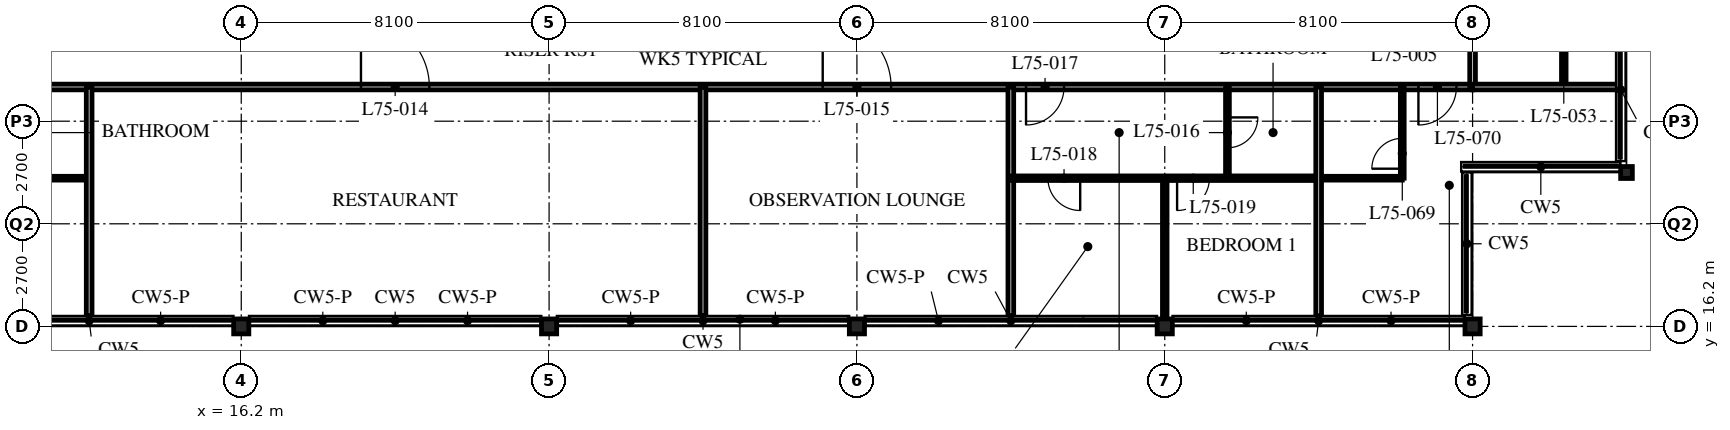
"""IFC4 building model, lengths in metres.
Left out: names, types, materials, properties, quantities, classifications, styles, units other than length and angle.
Written with IfcOpenShell. Run it as: python <this file> out.ifc"""

import sys

from ifc_helpers import new_model, si_unit, direction, frame, frame_2d, origin, origin_2d, place, context, subcontext, project, spatial, rectangle, i_section, extrude, element, fill, save


model = new_model("IFC4")
c1 = context("Model", 3, precision=1e-05, world=origin(), true_north=direction((0.0, 1.0)))
c2 = subcontext(c1, "Body", "Model", "MODEL_VIEW")
j1 = project(units=[si_unit("LENGTHUNIT", "METRE"), si_unit("PLANEANGLEUNIT", "RADIAN")], contexts=[c1])
p1 = place(None, origin())
s1 = spatial("IfcSite", under=j1, at=p1, CompositionType="ELEMENT")
p2 = place(p1, origin())
s2 = spatial("IfcBuilding", under=s1, at=p2, CompositionType="ELEMENT")
p3 = place(p2, frame((0.0, 0.0, 293.1)))
s3 = spatial("IfcBuildingStorey", under=s2, at=p3, CompositionType="ELEMENT", Elevation=293.1)
for number, where, z_axis, x_axis in (
    (1, (16.2, 16.2, 0.0), (0.0, 0.0, 1.0), (1.0, 0.0, 0.0)),
    (2, (24.3, 16.2, 0.0), (0.0, 0.0, 1.0), (1.0, 0.0, 0.0)),
    (3, (32.4, 16.2, 0.0), (0.0, 0.0, 1.0), (1.0, 0.0, 0.0)),
    (4, (40.5, 16.2, 0.0), (0.0, 0.0, 1.0), (1.0, 0.0, 0.0)),
    (5, (48.6, 16.2, 0.0), (0.0, 0.0, 1.0), (1.0, 0.0, 0.0)),
):
    element("IfcColumn", number, at=place(p3, frame(where, z_axis=z_axis, x_axis=x_axis)), inside=s3, PredefinedType="COLUMN", context=c2, shape_type="SweptSolid", body=[
        extrude(i_section(OverallWidth=0.399, OverallDepth=0.394, WebThickness=0.023, FlangeThickness=0.037, FilletRadius=0.015, at=origin_2d()), origin(), (0.0, 0.0, 1.0), 5.4),
    ])
p4 = place(p3, frame((52.65, 20.25, 0.0), z_axis=(0.0, 0.0, 1.0), x_axis=(1.0, 0.0, 0.0)))
e6 = element("IfcColumn", 6, at=p4, inside=s3, PredefinedType="COLUMN", context=c2, shape_type="SweptSolid", body=[
    extrude(i_section(OverallWidth=0.307, OverallDepth=0.314, WebThickness=0.012, FlangeThickness=0.019, FilletRadius=0.015, at=origin_2d()), origin(), (0.0, 0.0, 1.0), 5.4),
])
p5 = place(p3, frame((8.1, 22.5, 0.0), z_axis=(0.0, 0.0, 1.0), x_axis=(1.0, 0.0, 0.0)))
e7 = element("IfcWall", 7, at=p5, inside=s3, PredefinedType="PARTITIONING", context=c2, shape_type="SweptSolid", body=[
    extrude(rectangle(XDim=40.5, YDim=0.15, at=frame_2d((20.25, 0.0))), origin(), (0.0, 0.0, 1.0), 5.19),
])
p6 = place(p5, frame((11.25, 0.0, 0.0)))
e8 = element("IfcOpeningElement", 8, at=p6, cuts=e7, PredefinedType="OPENING", context=c2, shape_type="SweptSolid", body=[
    extrude(rectangle(XDim=1.8, YDim=2.4, at=frame_2d((0.9, 1.2))), frame((0.0, 0.085, 0.0), z_axis=(0.0, -1.0, 0.0), x_axis=(1.0, 0.0, 0.0)), (0.0, 0.0, 1.0), 0.17),
])
p7 = place(p5, frame((23.4, 0.0, 0.0)))
e9 = element("IfcOpeningElement", 9, at=p7, cuts=e7, PredefinedType="OPENING", context=c2, shape_type="SweptSolid", body=[
    extrude(rectangle(XDim=1.8, YDim=2.4, at=frame_2d((0.9, 1.2))), frame((0.0, 0.085, 0.0), z_axis=(0.0, -1.0, 0.0), x_axis=(1.0, 0.0, 0.0)), (0.0, 0.0, 1.0), 0.17),
])
p8 = place(p5, frame((28.75, 0.0, 0.0)))
e10 = element("IfcOpeningElement", 10, at=p8, cuts=e7, PredefinedType="OPENING", context=c2, shape_type="SweptSolid", body=[
    extrude(rectangle(XDim=1.0, YDim=2.1, at=frame_2d((0.5, 1.05))), frame((0.0, 0.085, 0.0), z_axis=(0.0, -1.0, 0.0), x_axis=(1.0, 0.0, 0.0)), (0.0, 0.0, 1.0), 0.17),
])
p9 = place(p5, frame((0.425, 0.0, 0.0)))
e11 = element("IfcOpeningElement", 11, at=p9, cuts=e7, PredefinedType="OPENING", context=c2, shape_type="SweptSolid", body=[
    extrude(rectangle(XDim=1.0, YDim=2.1, at=frame_2d((0.5, 1.05))), frame((0.0, 0.085, 0.0), z_axis=(0.0, -1.0, 0.0), x_axis=(1.0, 0.0, 0.0)), (0.0, 0.0, 1.0), 0.17),
])
p10 = place(p5, frame((39.075, 0.0, 0.0)))
e12 = element("IfcOpeningElement", 12, at=p10, cuts=e7, PredefinedType="OPENING", context=c2, shape_type="SweptSolid", body=[
    extrude(rectangle(XDim=1.0, YDim=2.1, at=frame_2d((0.5, 1.05))), frame((0.0, 0.085, 0.0), z_axis=(0.0, -1.0, 0.0), x_axis=(1.0, 0.0, 0.0)), (0.0, 0.0, 1.0), 0.17),
])
p11 = place(p3, frame((48.6, 22.5, 0.0), z_axis=(0.0, 0.0, 1.0), x_axis=(0.0, 1.0, 0.0)))
e13 = element("IfcWall", 13, at=p11, inside=s3, PredefinedType="PARTITIONING", context=c2, shape_type="SweptSolid", body=[
    extrude(rectangle(XDim=34.2, YDim=0.15, at=frame_2d((17.1, 0.0))), origin(), (0.0, 0.0, 1.0), 4.271),
])
p12 = place(p11, frame((2.65, 0.0, 0.0)))
e14 = element("IfcOpeningElement", 14, at=p12, cuts=e13, PredefinedType="OPENING", context=c2, shape_type="SweptSolid", body=[
    extrude(rectangle(XDim=1.0, YDim=2.1, at=frame_2d((0.5, 1.05))), frame((0.0, 0.085, 0.0), z_axis=(0.0, -1.0, 0.0), x_axis=(1.0, 0.0, 0.0)), (0.0, 0.0, 1.0), 0.17),
])
p13 = place(p11, frame((10.8, 0.0, 0.0)))
e15 = element("IfcOpeningElement", 15, at=p13, cuts=e13, PredefinedType="OPENING", context=c2, shape_type="SweptSolid", body=[
    extrude(rectangle(XDim=1.0, YDim=2.1, at=frame_2d((0.5, 1.05))), frame((0.0, 0.085, 0.0), z_axis=(0.0, -1.0, 0.0), x_axis=(1.0, 0.0, 0.0)), (0.0, 0.0, 1.0), 0.17),
])
p14 = place(p11, frame((18.9, 0.0, 0.0)))
e16 = element("IfcOpeningElement", 16, at=p14, cuts=e13, PredefinedType="OPENING", context=c2, shape_type="SweptSolid", body=[
    extrude(rectangle(XDim=1.0, YDim=2.1, at=frame_2d((0.5, 1.05))), frame((0.0, 0.085, 0.0), z_axis=(0.0, -1.0, 0.0), x_axis=(1.0, 0.0, 0.0)), (0.0, 0.0, 1.0), 0.17),
])
p15 = place(p11, frame((27.0, 0.0, 0.0)))
e17 = element("IfcOpeningElement", 17, at=p15, cuts=e13, PredefinedType="OPENING", context=c2, shape_type="SweptSolid", body=[
    extrude(rectangle(XDim=1.0, YDim=2.1, at=frame_2d((0.5, 1.05))), frame((0.0, 0.085, 0.0), z_axis=(0.0, -1.0, 0.0), x_axis=(1.0, 0.0, 0.0)), (0.0, 0.0, 1.0), 0.17),
])
for number, where, z_axis, x_axis in (
    (18, (28.35, 22.5, 0.0), (0.0, 0.0, 1.0), (0.0, -1.0, 0.0)),
    (19, (36.45, 22.5, 0.0), (0.0, 0.0, 1.0), (0.0, -1.0, 0.0)),
):
    element("IfcWall", number, at=place(p3, frame(where, z_axis=z_axis, x_axis=x_axis)), inside=s3, PredefinedType="PARTITIONING", context=c2, shape_type="SweptSolid", body=[
        extrude(rectangle(XDim=6.022, YDim=0.15, at=frame_2d((3.011, 0.0))), origin(), (0.0, 0.0, 1.0), 5.19),
    ])
p16 = place(p3, frame((36.45, 20.1, 0.0), z_axis=(0.0, 0.0, 1.0), x_axis=(1.0, 0.0, 0.0)))
e20 = element("IfcWall", 20, at=p16, inside=s3, PredefinedType="PARTITIONING", context=c2, shape_type="SweptSolid", body=[
    extrude(rectangle(XDim=8.1, YDim=0.12, at=frame_2d((4.05, 0.0))), origin(), (0.0, 0.0, 1.0), 5.19),
])
p17 = place(p16, frame((0.975, 0.0, 0.0)))
e21 = element("IfcOpeningElement", 21, at=p17, cuts=e20, PredefinedType="OPENING", context=c2, shape_type="SweptSolid", body=[
    extrude(rectangle(XDim=0.85, YDim=2.1, at=frame_2d((0.425, 1.05))), frame((0.0, 0.07, 0.0), z_axis=(0.0, -1.0, 0.0), x_axis=(1.0, 0.0, 0.0)), (0.0, 0.0, 1.0), 0.14),
])
p18 = place(p16, frame((4.375, 0.0, 0.0)))
e22 = element("IfcOpeningElement", 22, at=p18, cuts=e20, PredefinedType="OPENING", context=c2, shape_type="SweptSolid", body=[
    extrude(rectangle(XDim=0.85, YDim=2.1, at=frame_2d((0.425, 1.05))), frame((0.0, 0.07, 0.0), z_axis=(0.0, -1.0, 0.0), x_axis=(1.0, 0.0, 0.0)), (0.0, 0.0, 1.0), 0.14),
])
p19 = place(p3, frame((42.15, 22.5, 0.0), z_axis=(0.0, 0.0, 1.0), x_axis=(0.0, -1.0, 0.0)))
e23 = element("IfcWall", 23, at=p19, inside=s3, PredefinedType="PARTITIONING", context=c2, shape_type="SweptSolid", body=[
    extrude(rectangle(XDim=2.4, YDim=0.1, at=frame_2d((1.2, 0.0))), origin(), (0.0, 0.0, 1.0), 5.19),
])
p20 = place(p19, frame((0.8, 0.0, 0.0)))
e24 = element("IfcOpeningElement", 24, at=p20, cuts=e23, PredefinedType="OPENING", context=c2, shape_type="SweptSolid", body=[
    extrude(rectangle(XDim=0.8, YDim=2.1, at=frame_2d((0.4, 1.05))), frame((0.0, 0.06, 0.0), z_axis=(0.0, -1.0, 0.0), x_axis=(1.0, 0.0, 0.0)), (0.0, 0.0, 1.0), 0.12),
])
p21 = place(p3, frame((40.5, 20.1, 0.0), z_axis=(0.0, 0.0, 1.0), x_axis=(0.0, -1.0, 0.0)))
e25 = element("IfcWall", 25, at=p21, inside=s3, PredefinedType="PARTITIONING", context=c2, shape_type="SweptSolid", body=[
    extrude(rectangle(XDim=3.6, YDim=0.12, at=frame_2d((1.8, 0.0))), origin(), (0.0, 0.0, 1.0), 4.271),
])
p22 = place(p3, frame((51.0, 22.5, 0.0), z_axis=(0.0, 0.0, 1.0), x_axis=(0.0, 1.0, 0.0)))
e26 = element("IfcWall", 26, at=p22, inside=s3, PredefinedType="PARTITIONING", context=c2, shape_type="SweptSolid", body=[
    extrude(rectangle(XDim=34.2, YDim=0.12, at=frame_2d((17.1, 0.0))), origin(), (0.0, 0.0, 1.0), 5.19),
])
p23 = place(p22, frame((0.975, 0.0, 0.0)))
e27 = element("IfcOpeningElement", 27, at=p23, cuts=e26, PredefinedType="OPENING", context=c2, shape_type="SweptSolid", body=[
    extrude(rectangle(XDim=0.85, YDim=2.1, at=frame_2d((0.425, 1.05))), frame((0.0, 0.07, 0.0), z_axis=(0.0, -1.0, 0.0), x_axis=(1.0, 0.0, 0.0)), (0.0, 0.0, 1.0), 0.14),
])
p24 = place(p22, frame((6.175, 0.0, 0.0)))
e28 = element("IfcOpeningElement", 28, at=p24, cuts=e26, PredefinedType="OPENING", context=c2, shape_type="SweptSolid", body=[
    extrude(rectangle(XDim=0.85, YDim=2.1, at=frame_2d((0.425, 1.05))), frame((0.0, 0.07, 0.0), z_axis=(0.0, -1.0, 0.0), x_axis=(1.0, 0.0, 0.0)), (0.0, 0.0, 1.0), 0.14),
])
p25 = place(p22, frame((10.875, 0.0, 0.0)))
e29 = element("IfcOpeningElement", 29, at=p25, cuts=e26, PredefinedType="OPENING", context=c2, shape_type="SweptSolid", body=[
    extrude(rectangle(XDim=0.85, YDim=2.1, at=frame_2d((0.425, 1.05))), frame((0.0, 0.07, 0.0), z_axis=(0.0, -1.0, 0.0), x_axis=(1.0, 0.0, 0.0)), (0.0, 0.0, 1.0), 0.14),
])
p26 = place(p22, frame((14.275, 0.0, 0.0)))
e30 = element("IfcOpeningElement", 30, at=p26, cuts=e26, PredefinedType="OPENING", context=c2, shape_type="SweptSolid", body=[
    extrude(rectangle(XDim=0.85, YDim=2.1, at=frame_2d((0.425, 1.05))), frame((0.0, 0.07, 0.0), z_axis=(0.0, -1.0, 0.0), x_axis=(1.0, 0.0, 0.0)), (0.0, 0.0, 1.0), 0.14),
])
p27 = place(p22, frame((18.975, 0.0, 0.0)))
e31 = element("IfcOpeningElement", 31, at=p27, cuts=e26, PredefinedType="OPENING", context=c2, shape_type="SweptSolid", body=[
    extrude(rectangle(XDim=0.85, YDim=2.1, at=frame_2d((0.425, 1.05))), frame((0.0, 0.07, 0.0), z_axis=(0.0, -1.0, 0.0), x_axis=(1.0, 0.0, 0.0)), (0.0, 0.0, 1.0), 0.14),
])
p28 = place(p22, frame((22.375, 0.0, 0.0)))
e32 = element("IfcOpeningElement", 32, at=p28, cuts=e26, PredefinedType="OPENING", context=c2, shape_type="SweptSolid", body=[
    extrude(rectangle(XDim=0.85, YDim=2.1, at=frame_2d((0.425, 1.05))), frame((0.0, 0.07, 0.0), z_axis=(0.0, -1.0, 0.0), x_axis=(1.0, 0.0, 0.0)), (0.0, 0.0, 1.0), 0.14),
])
p29 = place(p22, frame((27.075, 0.0, 0.0)))
e33 = element("IfcOpeningElement", 33, at=p29, cuts=e26, PredefinedType="OPENING", context=c2, shape_type="SweptSolid", body=[
    extrude(rectangle(XDim=0.85, YDim=2.1, at=frame_2d((0.425, 1.05))), frame((0.0, 0.07, 0.0), z_axis=(0.0, -1.0, 0.0), x_axis=(1.0, 0.0, 0.0)), (0.0, 0.0, 1.0), 0.14),
])
p30 = place(p22, frame((30.475, 0.0, 0.0)))
e34 = element("IfcOpeningElement", 34, at=p30, cuts=e26, PredefinedType="OPENING", context=c2, shape_type="SweptSolid", body=[
    extrude(rectangle(XDim=0.85, YDim=2.1, at=frame_2d((0.425, 1.05))), frame((0.0, 0.07, 0.0), z_axis=(0.0, -1.0, 0.0), x_axis=(1.0, 0.0, 0.0)), (0.0, 0.0, 1.0), 0.14),
])
p31 = place(p3, frame((9.95, 20.1, 0.0), z_axis=(0.0, 0.0, 1.0), x_axis=(1.0, 0.0, 0.0)))
e35 = element("IfcWall", 35, at=p31, inside=s3, PredefinedType="PARTITIONING", context=c2, shape_type="SweptSolid", body=[
    extrude(rectangle(XDim=2.248, YDim=0.1, at=frame_2d((1.124, 0.0))), origin(), (0.0, 0.0, 1.0), 5.19),
])
p32 = place(p3, frame((12.198, 22.5, 0.0), z_axis=(0.0, 0.0, 1.0), x_axis=(0.0, -1.0, 0.0)))
e36 = element("IfcWall", 36, at=p32, inside=s3, PredefinedType="PARTITIONING", context=c2, shape_type="SweptSolid", body=[
    extrude(rectangle(XDim=6.022, YDim=0.15, at=frame_2d((3.011, 0.0))), origin(), (0.0, 0.0, 1.0), 5.19),
])
p33 = place(p3, frame((44.55, 20.1, 0.0), z_axis=(0.0, 0.0, 1.0), x_axis=(1.0, 0.0, 0.0)))
e37 = element("IfcWall", 37, at=p33, inside=s3, PredefinedType="PARTITIONING", context=c2, shape_type="SweptSolid", body=[
    extrude(rectangle(XDim=2.2, YDim=0.1, at=frame_2d((1.1, 0.0))), origin(), (0.0, 0.0, 1.0), 5.19),
])
p34 = place(p3, frame((46.75, 22.5, 0.0), z_axis=(0.0, 0.0, 1.0), x_axis=(0.0, -1.0, 0.0)))
e38 = element("IfcWall", 38, at=p34, inside=s3, PredefinedType="PARTITIONING", context=c2, shape_type="SweptSolid", body=[
    extrude(rectangle(XDim=2.4, YDim=0.1, at=frame_2d((1.2, 0.0))), origin(), (0.0, 0.0, 1.0), 5.19),
])
p35 = place(p34, frame((1.35, 0.0, 0.0)))
e39 = element("IfcOpeningElement", 39, at=p35, cuts=e38, PredefinedType="OPENING", context=c2, shape_type="SweptSolid", body=[
    extrude(rectangle(XDim=0.8, YDim=2.1, at=frame_2d((0.4, 1.05))), frame((0.0, 0.06, 0.0), z_axis=(0.0, -1.0, 0.0), x_axis=(1.0, 0.0, 0.0)), (0.0, 0.0, 1.0), 0.12),
])
p36 = place(p3, frame((48.6, 22.5, 0.0), z_axis=(0.0, 0.0, 1.0), x_axis=(1.0, 0.0, 0.0)))
e40 = element("IfcWall", 40, at=p36, inside=s3, PredefinedType="PARTITIONING", context=c2, shape_type="SweptSolid", body=[
    extrude(rectangle(XDim=3.879, YDim=0.15, at=frame_2d((1.939, 0.0))), origin(), (0.0, 0.0, 1.0), 5.19),
])
p37 = place(p3, frame((44.55, 22.5, 0.0), z_axis=(0.0, 0.0, 1.0), x_axis=(0.0, -1.0, 0.0)))
e41 = element("IfcWall", 41, at=p37, inside=s3, PredefinedType="PARTITIONING", context=c2, shape_type="SweptSolid", body=[
    extrude(rectangle(XDim=6.022, YDim=0.15, at=frame_2d((3.011, 0.0))), origin(), (0.0, 0.0, 1.0), 5.19),
])
p38 = place(p6, origin())
e42 = element("IfcDoor", 42, at=p38, inside=s3, OperationType="DOUBLE_DOOR_SINGLE_SWING", PredefinedType="DOOR", context=c2, shape_type="SweptSolid", body=[
    extrude(rectangle(XDim=1.8, YDim=2.4, at=frame_2d((0.9, 1.2))), frame((0.0, 0.025, 0.0), z_axis=(0.0, -1.0, 0.0), x_axis=(1.0, 0.0, 0.0)), (0.0, 0.0, 1.0), 0.05),
])
fill(e8, e42)
p39 = place(p7, origin())
e43 = element("IfcDoor", 43, at=p39, inside=s3, OperationType="DOUBLE_DOOR_SINGLE_SWING", PredefinedType="DOOR", context=c2, shape_type="SweptSolid", body=[
    extrude(rectangle(XDim=1.8, YDim=2.4, at=frame_2d((0.9, 1.2))), frame((0.0, 0.025, 0.0), z_axis=(0.0, -1.0, 0.0), x_axis=(1.0, 0.0, 0.0)), (0.0, 0.0, 1.0), 0.05),
])
fill(e9, e43)
p40 = place(p20, origin())
e44 = element("IfcDoor", 44, at=p40, inside=s3, OperationType="SINGLE_SWING_LEFT", PredefinedType="DOOR", context=c2, shape_type="SweptSolid", body=[
    extrude(rectangle(XDim=0.8, YDim=2.1, at=frame_2d((0.4, 1.05))), frame((0.0, 0.025, 0.0), z_axis=(0.0, -1.0, 0.0), x_axis=(1.0, 0.0, 0.0)), (0.0, 0.0, 1.0), 0.05),
])
fill(e24, e44)
p41 = place(p8, origin())
e45 = element("IfcDoor", 45, at=p41, inside=s3, OperationType="SINGLE_SWING_RIGHT", PredefinedType="DOOR", context=c2, shape_type="SweptSolid", body=[
    extrude(rectangle(XDim=1.0, YDim=2.1, at=frame_2d((0.5, 1.05))), frame((0.0, 0.025, 0.0), z_axis=(0.0, -1.0, 0.0), x_axis=(1.0, 0.0, 0.0)), (0.0, 0.0, 1.0), 0.05),
])
fill(e10, e45)
p42 = place(p17, origin())
e46 = element("IfcDoor", 46, at=p42, inside=s3, OperationType="SINGLE_SWING_LEFT", PredefinedType="DOOR", context=c2, shape_type="SweptSolid", body=[
    extrude(rectangle(XDim=0.85, YDim=2.1, at=frame_2d((0.425, 1.05))), frame((0.0, 0.025, 0.0), z_axis=(0.0, -1.0, 0.0), x_axis=(1.0, 0.0, 0.0)), (0.0, 0.0, 1.0), 0.05),
])
fill(e21, e46)
p43 = place(p18, origin())
e47 = element("IfcDoor", 47, at=p43, inside=s3, OperationType="SINGLE_SWING_RIGHT", PredefinedType="DOOR", context=c2, shape_type="SweptSolid", body=[
    extrude(rectangle(XDim=0.85, YDim=2.1, at=frame_2d((0.425, 1.05))), frame((0.0, 0.025, 0.0), z_axis=(0.0, -1.0, 0.0), x_axis=(1.0, 0.0, 0.0)), (0.0, 0.0, 1.0), 0.05),
])
fill(e22, e47)
p44 = place(p35, origin())
e48 = element("IfcDoor", 48, at=p44, inside=s3, OperationType="SINGLE_SWING_LEFT", PredefinedType="DOOR", context=c2, shape_type="SweptSolid", body=[
    extrude(rectangle(XDim=0.8, YDim=2.1, at=frame_2d((0.4, 1.05))), frame((0.0, 0.025, 0.0), z_axis=(0.0, -1.0, 0.0), x_axis=(1.0, 0.0, 0.0)), (0.0, 0.0, 1.0), 0.05),
])
fill(e39, e48)
p45 = place(p10, origin())
e49 = element("IfcDoor", 49, at=p45, inside=s3, OperationType="SINGLE_SWING_RIGHT", PredefinedType="DOOR", context=c2, shape_type="SweptSolid", body=[
    extrude(rectangle(XDim=1.0, YDim=2.1, at=frame_2d((0.5, 1.05))), frame((0.0, 0.025, 0.0), z_axis=(0.0, -1.0, 0.0), x_axis=(1.0, 0.0, 0.0)), (0.0, 0.0, 1.0), 0.05),
])
fill(e12, e49)
save(model, sys.argv[1])
